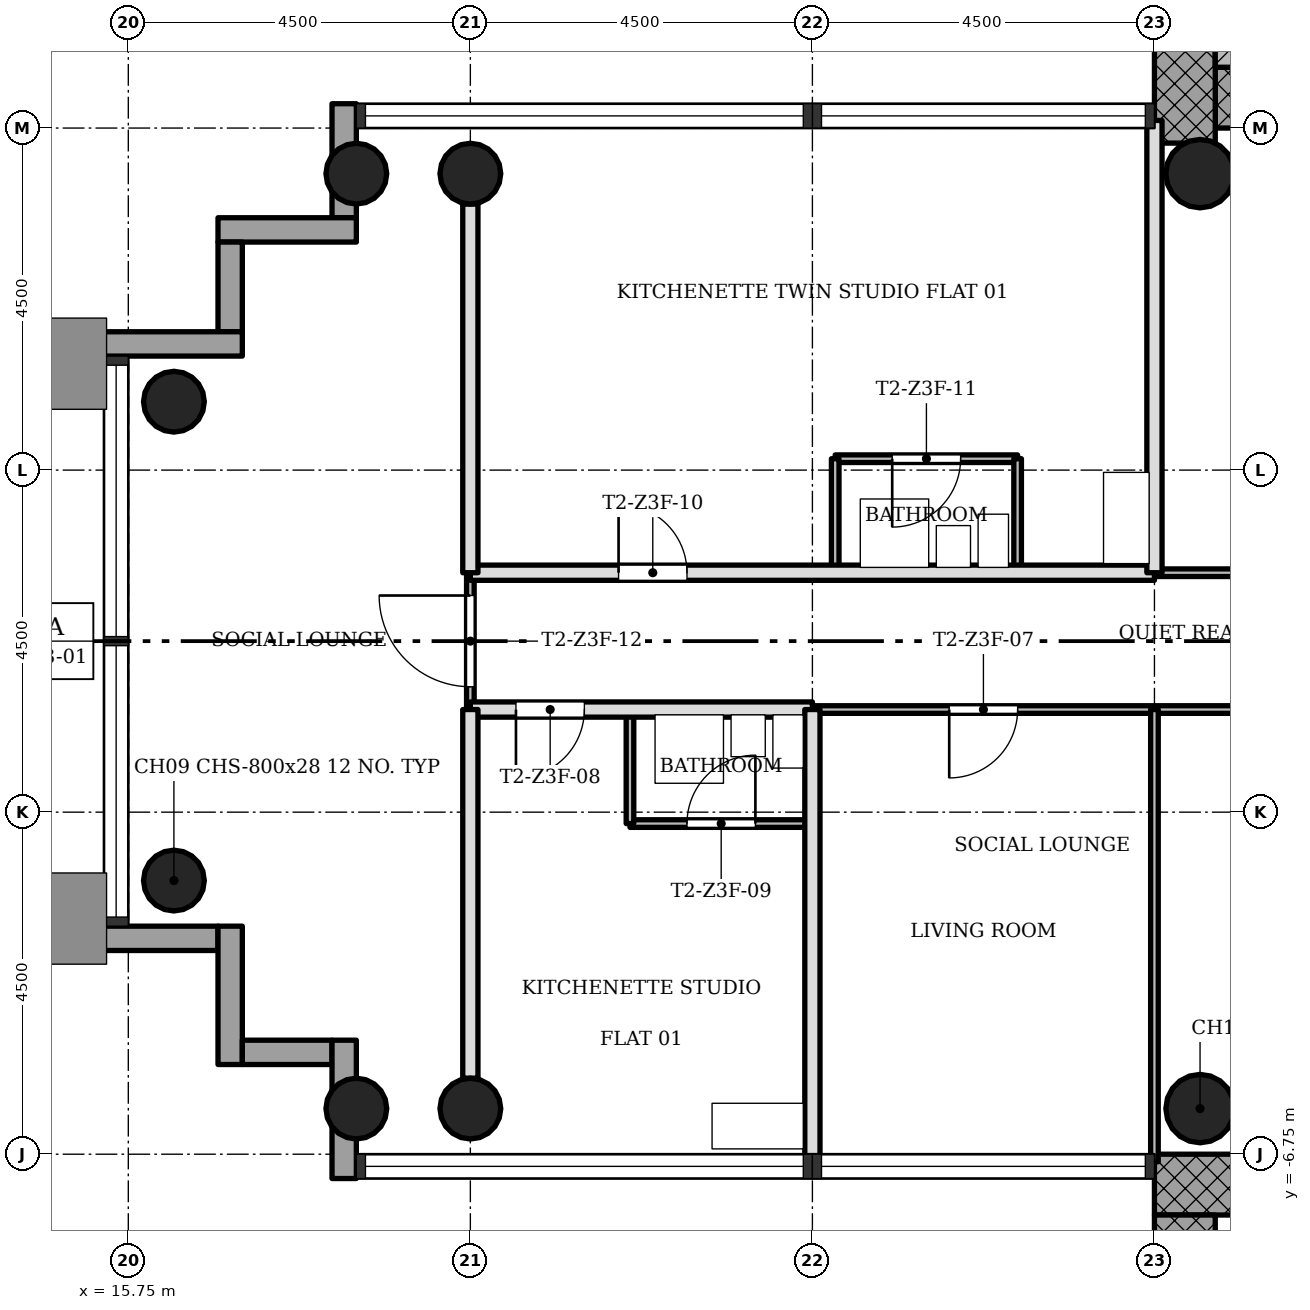
"""IFC4 building model, lengths in metres.
Left out: names, types, materials, properties, quantities, classifications, styles, units other than length and angle.
Written with IfcOpenShell. Run it as: python <this file> out.ifc"""

import sys

from ifc_helpers import new_model, si_unit, direction, frame, frame_2d, origin, origin_2d, place, context, subcontext, project, spatial, rectangle, hollow_circle, extrude, element, fill, save


model = new_model("IFC4")
c1 = context("Model", 3, precision=1e-05, world=origin(), true_north=direction((0.0, 1.0)))
c2 = subcontext(c1, "Body", "Model", "MODEL_VIEW")
j1 = project(units=[si_unit("LENGTHUNIT", "METRE"), si_unit("PLANEANGLEUNIT", "RADIAN")], contexts=[c1])
p1 = place(None, origin())
s1 = spatial("IfcSite", under=j1, at=p1, CompositionType="ELEMENT")
p2 = place(p1, origin())
s2 = spatial("IfcBuilding", under=s1, at=p2, CompositionType="ELEMENT")
p3 = place(p2, frame((0.0, 0.0, 171.1)))
s3 = spatial("IfcBuildingStorey", under=s2, at=p3, CompositionType="ELEMENT", Elevation=171.1)
p4 = place(p3, frame((30.05, 7.15, 0.0), z_axis=(0.0, 0.0, 1.0), x_axis=(1.0, 0.0, 0.0)))
e1 = element("IfcWall", 1, at=p4, inside=s3, PredefinedType="SHEAR", context=c2, shape_type="SweptSolid", body=[
    extrude(rectangle(XDim=12.7, YDim=0.8, at=frame_2d((6.35, 0.0))), origin(), (0.0, 0.0, 1.0), 3.4),
])
p5 = place(p4, frame((5.05, 0.0, 0.0)))
e2 = element("IfcOpeningElement", 2, at=p5, cuts=e1, PredefinedType="OPENING", context=c2, shape_type="SweptSolid", body=[
    extrude(rectangle(XDim=1.8, YDim=2.1, at=frame_2d((0.9, 1.05))), frame((0.0, 0.41, 0.0), z_axis=(0.0, -1.0, 0.0), x_axis=(1.0, 0.0, 0.0)), (0.0, 0.0, 1.0), 0.82),
])
p6 = place(p3, frame((29.65, 15.348, 0.0), z_axis=(0.0, 0.0, 1.0), x_axis=(0.0, -1.0, 0.0)))
e3 = element("IfcWall", 3, at=p6, inside=s3, PredefinedType="SHEAR", context=c2, shape_type="SweptSolid", body=[
    extrude(rectangle(XDim=8.796, YDim=0.8, at=frame_2d((4.398, 0.0))), origin(), (0.0, 0.0, 1.0), 3.4),
])
p7 = place(p3, frame((41.95, -7.15, 0.0), z_axis=(0.0, 0.0, 1.0), x_axis=(-1.0, 0.0, 0.0)))
e4 = element("IfcWall", 4, at=p7, inside=s3, PredefinedType="SHEAR", context=c2, shape_type="SweptSolid", body=[
    extrude(rectangle(XDim=12.7, YDim=0.8, at=frame_2d((6.35, 0.0))), origin(), (0.0, 0.0, 1.0), 3.4),
])
p8 = place(p7, frame((5.05, 0.0, 0.0)))
e5 = element("IfcOpeningElement", 5, at=p8, cuts=e4, PredefinedType="OPENING", context=c2, shape_type="SweptSolid", body=[
    extrude(rectangle(XDim=1.8, YDim=2.1, at=frame_2d((0.9, 1.05))), frame((0.0, 0.41, 0.0), z_axis=(0.0, -1.0, 0.0), x_axis=(1.0, 0.0, 0.0)), (0.0, 0.0, 1.0), 0.82),
])
p9 = place(p3, frame((29.65, -7.55, 0.0), z_axis=(0.0, 0.0, 1.0), x_axis=(0.0, -1.0, 0.0)))
e6 = element("IfcWall", 6, at=p9, inside=s3, PredefinedType="SHEAR", context=c2, shape_type="SweptSolid", body=[
    extrude(rectangle(XDim=8.2, YDim=0.8, at=frame_2d((4.1, 0.0))), origin(), (0.0, 0.0, 1.0), 3.4),
])
for number, where, z_axis, x_axis in (
    (7, (20.25, 6.15, 0.0), (0.0, 0.0, 1.0), (1.0, 0.0, 0.0)),
    (8, (20.25, -6.15, 0.0), (0.0, 0.0, 1.0), (1.0, 0.0, 0.0)),
    (9, (18.75, 6.15, 0.0), (0.0, 0.0, 1.0), (1.0, 0.0, 0.0)),
    (10, (18.75, -6.15, 0.0), (0.0, 0.0, 1.0), (1.0, 0.0, 0.0)),
    (11, (16.35, 3.15, 0.0), (0.0, 0.0, 1.0), (1.0, 0.0, 0.0)),
    (12, (16.35, -3.15, 0.0), (0.0, 0.0, 1.0), (1.0, 0.0, 0.0)),
):
    element("IfcColumn", number, at=place(p3, frame(where, z_axis=z_axis, x_axis=x_axis)), inside=s3, PredefinedType="COLUMN", context=c2, shape_type="SweptSolid", body=[
        extrude(hollow_circle(Radius=0.4, WallThickness=0.028, at=origin_2d()), origin(), (0.0, 0.0, 1.0), 3.4),
    ])
for number, where, z_axis, x_axis in (
    (13, (29.85, 6.15, 0.0), (0.0, 0.0, 1.0), (1.0, 0.0, 0.0)),
    (14, (29.85, -6.15, 0.0), (0.0, 0.0, 1.0), (1.0, 0.0, 0.0)),
):
    element("IfcColumn", number, at=place(p3, frame(where, z_axis=z_axis, x_axis=x_axis)), inside=s3, PredefinedType="COLUMN", context=c2, shape_type="SweptSolid", body=[
        extrude(hollow_circle(Radius=0.45, WallThickness=0.032, at=origin_2d()), origin(), (0.0, 0.0, 1.0), 3.4),
    ])
p10 = place(p3, frame((18.59, 7.07, -0.3), z_axis=(0.0, 0.0, 1.0), x_axis=(0.0, -1.0, 0.0)))
e15 = element("IfcWall", 15, at=p10, inside=s3, PredefinedType="STANDARD", context=c2, shape_type="SweptSolid", body=[
    extrude(rectangle(XDim=1.5, YDim=0.32, at=frame_2d((0.75, 0.0))), origin(), (0.0, 0.0, 1.0), 3.4),
])
p11 = place(p3, frame((18.75, 5.41, -0.3), z_axis=(0.0, 0.0, 1.0), x_axis=(-1.0, 0.0, 0.0)))
e16 = element("IfcWall", 16, at=p11, inside=s3, PredefinedType="STANDARD", context=c2, shape_type="SweptSolid", body=[
    extrude(rectangle(XDim=1.82, YDim=0.32, at=frame_2d((0.91, 0.0))), origin(), (0.0, 0.0, 1.0), 3.4),
])
p12 = place(p3, frame((17.09, 5.25, -0.3), z_axis=(0.0, 0.0, 1.0), x_axis=(0.0, -1.0, 0.0)))
e17 = element("IfcWall", 17, at=p12, inside=s3, PredefinedType="STANDARD", context=c2, shape_type="SweptSolid", body=[
    extrude(rectangle(XDim=1.18, YDim=0.32, at=frame_2d((0.59, 0.0))), origin(), (0.0, 0.0, 1.0), 3.4),
])
p13 = place(p3, frame((17.25, 3.91, -0.3), z_axis=(0.0, 0.0, 1.0), x_axis=(-1.0, 0.0, 0.0)))
e18 = element("IfcWall", 18, at=p13, inside=s3, PredefinedType="STANDARD", context=c2, shape_type="SweptSolid", body=[
    extrude(rectangle(XDim=1.82, YDim=0.32, at=frame_2d((0.91, 0.0))), origin(), (0.0, 0.0, 1.0), 3.4),
])
p14 = place(p3, frame((15.43, -3.91, -0.3), z_axis=(0.0, 0.0, 1.0), x_axis=(1.0, 0.0, 0.0)))
e19 = element("IfcWall", 19, at=p14, inside=s3, PredefinedType="STANDARD", context=c2, shape_type="SweptSolid", body=[
    extrude(rectangle(XDim=1.5, YDim=0.32, at=frame_2d((0.75, 0.0))), origin(), (0.0, 0.0, 1.0), 3.4),
])
p15 = place(p3, frame((17.09, -3.75, -0.3), z_axis=(0.0, 0.0, 1.0), x_axis=(0.0, -1.0, 0.0)))
e20 = element("IfcWall", 20, at=p15, inside=s3, PredefinedType="STANDARD", context=c2, shape_type="SweptSolid", body=[
    extrude(rectangle(XDim=1.82, YDim=0.32, at=frame_2d((0.91, 0.0))), origin(), (0.0, 0.0, 1.0), 3.4),
])
p16 = place(p3, frame((17.25, -5.41, -0.3), z_axis=(0.0, 0.0, 1.0), x_axis=(1.0, 0.0, 0.0)))
e21 = element("IfcWall", 21, at=p16, inside=s3, PredefinedType="STANDARD", context=c2, shape_type="SweptSolid", body=[
    extrude(rectangle(XDim=1.18, YDim=0.32, at=frame_2d((0.59, 0.0))), origin(), (0.0, 0.0, 1.0), 3.4),
])
p17 = place(p3, frame((18.59, -5.25, -0.3), z_axis=(0.0, 0.0, 1.0), x_axis=(0.0, -1.0, 0.0)))
e22 = element("IfcWall", 22, at=p17, inside=s3, PredefinedType="STANDARD", context=c2, shape_type="SweptSolid", body=[
    extrude(rectangle(XDim=1.82, YDim=0.32, at=frame_2d((0.91, 0.0))), origin(), (0.0, 0.0, 1.0), 3.4),
])
p18 = place(p3, frame((24.75, -2.4, 0.0), z_axis=(0.0, 0.0, 1.0), x_axis=(-1.0, 0.0, 0.0)))
e23 = element("IfcWall", 23, at=p18, inside=s3, PredefinedType="PARTITIONING", context=c2, shape_type="SweptSolid", body=[
    extrude(rectangle(XDim=2.4, YDim=0.1, at=frame_2d((1.2, 0.0))), origin(), (0.0, 0.0, 1.0), 3.0),
])
p19 = place(p18, frame((0.75, 0.0, 0.0)))
e24 = element("IfcOpeningElement", 24, at=p19, cuts=e23, PredefinedType="OPENING", context=c2, shape_type="SweptSolid", body=[
    extrude(rectangle(XDim=0.9, YDim=2.1, at=frame_2d((0.45, 1.05))), frame((0.0, 0.06, 0.0), z_axis=(0.0, -1.0, 0.0), x_axis=(1.0, 0.0, 0.0)), (0.0, 0.0, 1.0), 0.12),
])
p20 = place(p3, frame((31.5, -0.9, 0.0), z_axis=(0.0, 0.0, 1.0), x_axis=(-1.0, 0.0, 0.0)))
e25 = element("IfcWall", 25, at=p20, inside=s3, PredefinedType="PARTITIONING", context=c2, shape_type="SweptSolid", body=[
    extrude(rectangle(XDim=6.75, YDim=0.1, at=frame_2d((3.375, 0.0))), origin(), (0.0, 0.0, 1.0), 3.0),
])
p21 = place(p20, frame((4.05, 0.0, 0.0)))
e26 = element("IfcOpeningElement", 26, at=p21, cuts=e25, PredefinedType="OPENING", context=c2, shape_type="SweptSolid", body=[
    extrude(rectangle(XDim=0.9, YDim=2.1, at=frame_2d((0.45, 1.05))), frame((0.0, 0.06, 0.0), z_axis=(0.0, -1.0, 0.0), x_axis=(1.0, 0.0, 0.0)), (0.0, 0.0, 1.0), 0.12),
])
p22 = place(p3, frame((24.75, -0.9, 0.0), z_axis=(0.0, 0.0, 1.0), x_axis=(-1.0, 0.0, 0.0)))
e27 = element("IfcWall", 27, at=p22, inside=s3, PredefinedType="SOLIDWALL", context=c2, shape_type="SweptSolid", body=[
    extrude(rectangle(XDim=4.5, YDim=0.2, at=frame_2d((2.25, 0.0))), origin(), (0.0, 0.0, 1.0), 3.0),
])
p23 = place(p22, frame((3.0, 0.0, 0.0)))
e28 = element("IfcOpeningElement", 28, at=p23, cuts=e27, PredefinedType="OPENING", context=c2, shape_type="SweptSolid", body=[
    extrude(rectangle(XDim=0.9, YDim=2.1, at=frame_2d((0.45, 1.05))), frame((0.0, 0.11, 0.0), z_axis=(0.0, -1.0, 0.0), x_axis=(1.0, 0.0, 0.0)), (0.0, 0.0, 1.0), 0.22),
])
p24 = place(p3, frame((31.5, 0.9, 0.0), z_axis=(0.0, 0.0, 1.0), x_axis=(-1.0, 0.0, 0.0)))
e29 = element("IfcWall", 29, at=p24, inside=s3, PredefinedType="PARTITIONING", context=c2, shape_type="SweptSolid", body=[
    extrude(rectangle(XDim=2.25, YDim=0.1, at=frame_2d((1.125, 0.0))), origin(), (0.0, 0.0, 1.0), 3.0),
])
p25 = place(p3, frame((29.25, 0.9, 0.0), z_axis=(0.0, 0.0, 1.0), x_axis=(-1.0, 0.0, 0.0)))
e30 = element("IfcWall", 30, at=p25, inside=s3, PredefinedType="SOLIDWALL", context=c2, shape_type="SweptSolid", body=[
    extrude(rectangle(XDim=9.0, YDim=0.2, at=frame_2d((4.5, 0.0))), origin(), (0.0, 0.0, 1.0), 3.0),
])
p26 = place(p25, frame((6.15, 0.0, 0.0)))
e31 = element("IfcOpeningElement", 31, at=p26, cuts=e30, PredefinedType="OPENING", context=c2, shape_type="SweptSolid", body=[
    extrude(rectangle(XDim=0.9, YDim=2.1, at=frame_2d((0.45, 1.05))), frame((0.0, 0.11, 0.0), z_axis=(0.0, -1.0, 0.0), x_axis=(1.0, 0.0, 0.0)), (0.0, 0.0, 1.0), 0.22),
])
p27 = place(p3, frame((27.45, 2.4, 0.0), z_axis=(0.0, 0.0, 1.0), x_axis=(-1.0, 0.0, 0.0)))
e32 = element("IfcWall", 32, at=p27, inside=s3, PredefinedType="PARTITIONING", context=c2, shape_type="SweptSolid", body=[
    extrude(rectangle(XDim=2.4, YDim=0.1, at=frame_2d((1.2, 0.0))), origin(), (0.0, 0.0, 1.0), 3.0),
])
p28 = place(p27, frame((0.75, 0.0, 0.0)))
e33 = element("IfcOpeningElement", 33, at=p28, cuts=e32, PredefinedType="OPENING", context=c2, shape_type="SweptSolid", body=[
    extrude(rectangle(XDim=0.9, YDim=2.1, at=frame_2d((0.45, 1.05))), frame((0.0, 0.06, 0.0), z_axis=(0.0, -1.0, 0.0), x_axis=(1.0, 0.0, 0.0)), (0.0, 0.0, 1.0), 0.12),
])
p29 = place(p3, frame((29.25, -6.85, 0.0), z_axis=(0.0, 0.0, 1.0), x_axis=(0.0, 1.0, 0.0)))
e34 = element("IfcWall", 34, at=p29, inside=s3, PredefinedType="PARTITIONING", context=c2, shape_type="SweptSolid", body=[
    extrude(rectangle(XDim=5.95, YDim=0.1, at=frame_2d((2.975, 0.0))), origin(), (0.0, 0.0, 1.0), 3.0),
])
p30 = place(p3, frame((29.25, 0.9, 0.0), z_axis=(0.0, 0.0, 1.0), x_axis=(0.0, 1.0, 0.0)))
e35 = element("IfcWall", 35, at=p30, inside=s3, PredefinedType="SOLIDWALL", context=c2, shape_type="SweptSolid", body=[
    extrude(rectangle(XDim=5.95, YDim=0.2, at=frame_2d((2.975, 0.0))), origin(), (0.0, 0.0, 1.0), 3.0),
])
for number, where, z_axis, x_axis in (
    (36, (27.45, 0.9, 0.0), (0.0, 0.0, 1.0), (0.0, 1.0, 0.0)),
    (37, (25.05, 0.9, 0.0), (0.0, 0.0, 1.0), (0.0, 1.0, 0.0)),
):
    element("IfcWall", number, at=place(p3, frame(where, z_axis=z_axis, x_axis=x_axis)), inside=s3, PredefinedType="PARTITIONING", context=c2, shape_type="SweptSolid", body=[
        extrude(rectangle(XDim=1.5, YDim=0.1, at=frame_2d((0.75, 0.0))), origin(), (0.0, 0.0, 1.0), 3.0),
    ])
p31 = place(p3, frame((24.75, -6.85, 0.0), z_axis=(0.0, 0.0, 1.0), x_axis=(0.0, 1.0, 0.0)))
e38 = element("IfcWall", 38, at=p31, inside=s3, PredefinedType="SOLIDWALL", context=c2, shape_type="SweptSolid", body=[
    extrude(rectangle(XDim=5.95, YDim=0.2, at=frame_2d((2.975, 0.0))), origin(), (0.0, 0.0, 1.0), 3.0),
])
p32 = place(p3, frame((22.35, -2.4, 0.0), z_axis=(0.0, 0.0, 1.0), x_axis=(0.0, 1.0, 0.0)))
e39 = element("IfcWall", 39, at=p32, inside=s3, PredefinedType="PARTITIONING", context=c2, shape_type="SweptSolid", body=[
    extrude(rectangle(XDim=1.5, YDim=0.1, at=frame_2d((0.75, 0.0))), origin(), (0.0, 0.0, 1.0), 3.0),
])
p33 = place(p3, frame((20.25, -0.9, 0.0), z_axis=(0.0, 0.0, 1.0), x_axis=(0.0, 1.0, 0.0)))
e40 = element("IfcWall", 40, at=p33, inside=s3, PredefinedType="PARTITIONING", context=c2, shape_type="SweptSolid", body=[
    extrude(rectangle(XDim=1.8, YDim=0.1, at=frame_2d((0.9, 0.0))), origin(), (0.0, 0.0, 1.0), 3.0),
])
p34 = place(p33, frame((0.3, 0.0, 0.0)))
e41 = element("IfcOpeningElement", 41, at=p34, cuts=e40, PredefinedType="OPENING", context=c2, shape_type="SweptSolid", body=[
    extrude(rectangle(XDim=1.2, YDim=2.1, at=frame_2d((0.6, 1.05))), frame((0.0, 0.06, 0.0), z_axis=(0.0, -1.0, 0.0), x_axis=(1.0, 0.0, 0.0)), (0.0, 0.0, 1.0), 0.12),
])
for number, where, z_axis, x_axis in (
    (42, (20.25, -5.75, 0.0), (0.0, 0.0, 1.0), (0.0, 1.0, 0.0)),
    (43, (20.25, 0.9, 0.0), (0.0, 0.0, 1.0), (0.0, 1.0, 0.0)),
):
    element("IfcWall", number, at=place(p3, frame(where, z_axis=z_axis, x_axis=x_axis)), inside=s3, PredefinedType="SOLIDWALL", context=c2, shape_type="SweptSolid", body=[
        extrude(rectangle(XDim=4.85, YDim=0.2, at=frame_2d((2.425, 0.0))), origin(), (0.0, 0.0, 1.0), 3.0),
    ])
p35 = place(p3, frame((34.15, 7.75, 0.0), z_axis=(0.0, 0.0, 1.0), x_axis=(-1.0, 0.0, 0.0)))
e44 = element("IfcWall", 44, at=p35, inside=s3, PredefinedType="SHEAR", context=c2, shape_type="SweptSolid", body=[
    extrude(rectangle(XDim=4.1, YDim=0.4, at=frame_2d((2.05, 0.0))), origin(), (0.0, 0.0, 1.0), 3.4),
])
p36 = place(p21, origin())
e45 = element("IfcDoor", 45, at=p36, inside=s3, OperationType="SINGLE_SWING_LEFT", PredefinedType="DOOR", context=c2, shape_type="SweptSolid", body=[
    extrude(rectangle(XDim=0.9, YDim=2.1, at=frame_2d((0.45, 1.05))), frame((0.0, 0.025, 0.0), z_axis=(0.0, -1.0, 0.0), x_axis=(1.0, 0.0, 0.0)), (0.0, 0.0, 1.0), 0.05),
])
fill(e26, e45)
p37 = place(p23, origin())
e46 = element("IfcDoor", 46, at=p37, inside=s3, OperationType="SINGLE_SWING_LEFT", PredefinedType="DOOR", context=c2, shape_type="SweptSolid", body=[
    extrude(rectangle(XDim=0.9, YDim=2.1, at=frame_2d((0.45, 1.05))), frame((0.0, 0.025, 0.0), z_axis=(0.0, -1.0, 0.0), x_axis=(1.0, 0.0, 0.0)), (0.0, 0.0, 1.0), 0.05),
])
fill(e28, e46)
p38 = place(p19, origin())
e47 = element("IfcDoor", 47, at=p38, inside=s3, OperationType="SINGLE_SWING_LEFT", PredefinedType="DOOR", context=c2, shape_type="SweptSolid", body=[
    extrude(rectangle(XDim=0.9, YDim=2.1, at=frame_2d((0.45, 1.05))), frame((0.0, 0.025, 0.0), z_axis=(0.0, -1.0, 0.0), x_axis=(1.0, 0.0, 0.0)), (0.0, 0.0, 1.0), 0.05),
])
fill(e24, e47)
p39 = place(p26, origin())
e48 = element("IfcDoor", 48, at=p39, inside=s3, OperationType="SINGLE_SWING_RIGHT", PredefinedType="DOOR", context=c2, shape_type="SweptSolid", body=[
    extrude(rectangle(XDim=0.9, YDim=2.1, at=frame_2d((0.45, 1.05))), frame((0.0, 0.025, 0.0), z_axis=(0.0, -1.0, 0.0), x_axis=(1.0, 0.0, 0.0)), (0.0, 0.0, 1.0), 0.05),
])
fill(e31, e48)
p40 = place(p28, origin())
e49 = element("IfcDoor", 49, at=p40, inside=s3, OperationType="SINGLE_SWING_LEFT", PredefinedType="DOOR", context=c2, shape_type="SweptSolid", body=[
    extrude(rectangle(XDim=0.9, YDim=2.1, at=frame_2d((0.45, 1.05))), frame((0.0, 0.025, 0.0), z_axis=(0.0, -1.0, 0.0), x_axis=(1.0, 0.0, 0.0)), (0.0, 0.0, 1.0), 0.05),
])
fill(e33, e49)
p41 = place(p34, origin())
e50 = element("IfcDoor", 50, at=p41, inside=s3, OperationType="SINGLE_SWING_LEFT", PredefinedType="DOOR", context=c2, shape_type="SweptSolid", body=[
    extrude(rectangle(XDim=1.2, YDim=2.1, at=frame_2d((0.6, 1.05))), frame((0.0, 0.025, 0.0), z_axis=(0.0, -1.0, 0.0), x_axis=(1.0, 0.0, 0.0)), (0.0, 0.0, 1.0), 0.05),
])
fill(e41, e50)
save(model, sys.argv[1])
